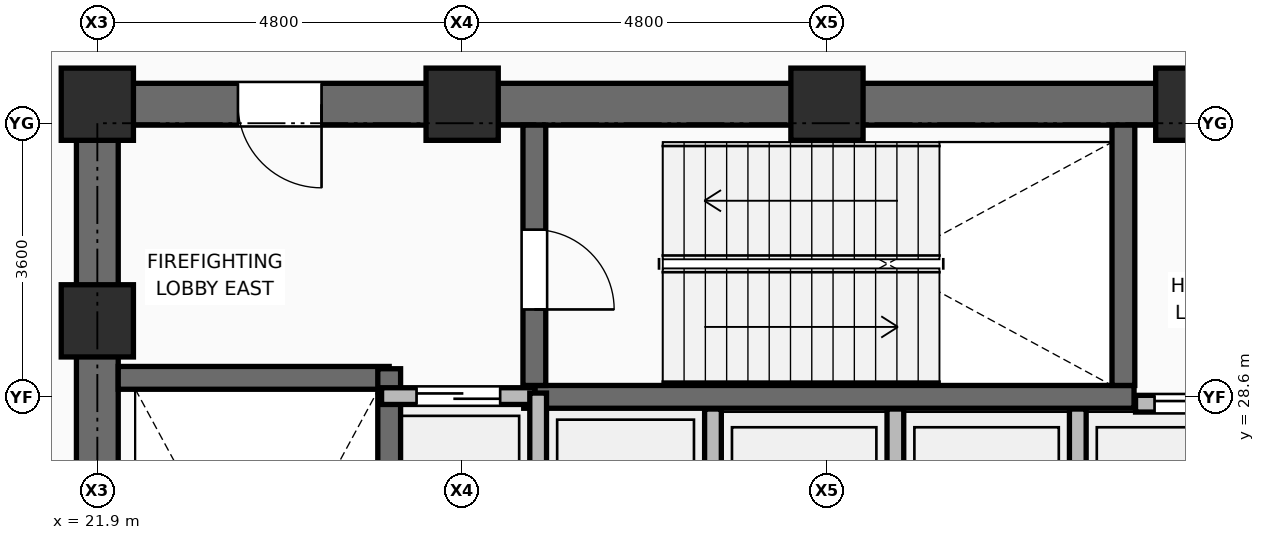
"""IFC4 building model, lengths in metres.
Left out: names, types, materials, properties, quantities, classifications, styles, units other than length and angle.
Written with IfcOpenShell. Run it as: python <this file> out.ifc"""

import sys

from ifc_helpers import new_model, si_unit, direction, frame, frame_2d, origin, origin_2d, place, context, subcontext, project, spatial, rectangle, extrude, element, fill, save


model = new_model("IFC4")
c1 = context("Model", 3, precision=1e-05, world=origin(), true_north=direction((0.0, 1.0)))
c2 = subcontext(c1, "Body", "Model", "MODEL_VIEW")
j1 = project(units=[si_unit("LENGTHUNIT", "METRE"), si_unit("PLANEANGLEUNIT", "RADIAN")], contexts=[c1])
p1 = place(None, origin())
s1 = spatial("IfcSite", under=j1, at=p1, CompositionType="ELEMENT")
p2 = place(p1, origin())
s2 = spatial("IfcBuilding", under=s1, at=p2, CompositionType="ELEMENT")
p3 = place(p2, frame((0.0, 0.0, 96.15)))
s3 = spatial("IfcBuildingStorey", under=s2, at=p3, CompositionType="ELEMENT", Elevation=96.15)
for number, where, z_axis, x_axis in (
    (1, (21.9, 29.6, 0.0), (0.0, 0.0, 1.0), (1.0, 0.0, 0.0)),
    (2, (21.9, 32.45, 0.0), (0.0, 0.0, 1.0), (1.0, 0.0, 0.0)),
    (3, (26.7, 32.45, 0.0), (0.0, 0.0, 1.0), (1.0, 0.0, 0.0)),
    (4, (31.5, 32.45, 0.0), (0.0, 0.0, 1.0), (1.0, 0.0, 0.0)),
    (5, (36.3, 32.45, 0.0), (0.0, 0.0, 1.0), (1.0, 0.0, 0.0)),
):
    element("IfcColumn", number, at=place(p3, frame(where, z_axis=z_axis, x_axis=x_axis)), inside=s3, PredefinedType="COLUMN", context=c2, shape_type="SweptSolid", body=[
        extrude(rectangle(XDim=0.95, YDim=0.95, at=origin_2d()), origin(), (0.0, 0.0, 1.0), 4.8),
    ])
p4 = place(p3, frame((30.0, 25.71, 0.0), z_axis=(0.0, 0.0, 1.0), x_axis=(0.0, 1.0, 0.0)))
e6 = element("IfcWall", 6, at=p4, inside=s3, PredefinedType="PARTITIONING", context=c2, shape_type="SweptSolid", body=[
    extrude(rectangle(XDim=2.73, YDim=0.22, at=frame_2d((1.365, 0.0))), origin(), (0.0, 0.0, 1.0), 4.595),
])
p5 = place(p3, frame((32.4, 26.2, 0.0), z_axis=(0.0, 0.0, 1.0), x_axis=(0.0, 1.0, 0.0)))
e7 = element("IfcWall", 7, at=p5, inside=s3, PredefinedType="PARTITIONING", context=c2, shape_type="SweptSolid", body=[
    extrude(rectangle(XDim=2.24, YDim=0.22, at=frame_2d((1.12, 0.0))), origin(), (0.0, 0.0, 1.0), 4.595),
])
p6 = place(p3, frame((34.8, 26.23, 0.0), z_axis=(0.0, 0.0, 1.0), x_axis=(0.0, 1.0, 0.0)))
e8 = element("IfcWall", 8, at=p6, inside=s3, PredefinedType="PARTITIONING", context=c2, shape_type="SweptSolid", body=[
    extrude(rectangle(XDim=2.21, YDim=0.22, at=frame_2d((1.105, 0.0))), origin(), (0.0, 0.0, 1.0), 4.595),
])
p7 = place(p3, frame((21.625, 32.45, 0.0), z_axis=(0.0, 0.0, 1.0), x_axis=(1.0, 0.0, 0.0)))
e9 = element("IfcWall", 9, at=p7, inside=s3, PredefinedType="SHEAR", context=c2, shape_type="SweptSolid", body=[
    extrude(rectangle(XDim=19.75, YDim=0.55, at=frame_2d((9.875, 0.0))), origin(), (0.0, 0.0, 1.0), 4.62),
])
p8 = place(p7, frame((2.125, 0.0, 0.0)))
e10 = element("IfcOpeningElement", 10, at=p8, cuts=e9, PredefinedType="OPENING", context=c2, shape_type="SweptSolid", body=[
    extrude(rectangle(XDim=1.1, YDim=2.1, at=frame_2d((0.55, 1.05))), frame((0.0, 0.285, 0.0), z_axis=(0.0, -1.0, 0.0), x_axis=(1.0, 0.0, 0.0)), (0.0, 0.0, 1.0), 0.57),
])
p9 = place(p7, frame((15.515, 0.0, 0.0)))
e11 = element("IfcOpeningElement", 11, at=p9, cuts=e9, PredefinedType="OPENING", context=c2, shape_type="SweptSolid", body=[
    extrude(rectangle(XDim=1.0, YDim=2.1, at=frame_2d((0.5, 1.05))), frame((0.0, 0.285, 0.0), z_axis=(0.0, -1.0, 0.0), x_axis=(1.0, 0.0, 0.0)), (0.0, 0.0, 1.0), 0.57),
])
p10 = place(p7, frame((17.525, 0.0, 0.0)))
e12 = element("IfcOpeningElement", 12, at=p10, cuts=e9, PredefinedType="OPENING", context=c2, shape_type="SweptSolid", body=[
    extrude(rectangle(XDim=0.9, YDim=2.1, at=frame_2d((0.45, 1.05))), frame((0.0, 0.285, 0.0), z_axis=(0.0, -1.0, 0.0), x_axis=(1.0, 0.0, 0.0)), (0.0, 0.0, 1.0), 0.57),
])
p11 = place(p3, frame((21.9, 18.075, 0.0), z_axis=(0.0, 0.0, 1.0), x_axis=(0.0, 1.0, 0.0)))
e13 = element("IfcWall", 13, at=p11, inside=s3, PredefinedType="SHEAR", context=c2, shape_type="SweptSolid", body=[
    extrude(rectangle(XDim=14.1, YDim=0.55, at=frame_2d((7.05, 0.0))), origin(), (0.0, 0.0, 1.0), 4.62),
])
p12 = place(p3, frame((22.175, 28.85, 0.0), z_axis=(0.0, 0.0, 1.0), x_axis=(1.0, 0.0, 0.0)))
e14 = element("IfcWall", 14, at=p12, inside=s3, PredefinedType="SHEAR", context=c2, shape_type="SweptSolid", body=[
    extrude(rectangle(XDim=3.565, YDim=0.3, at=frame_2d((1.782, 0.0))), origin(), (0.0, 0.0, 1.0), 4.62),
])
p13 = place(p3, frame((25.74, 20.98, 0.0), z_axis=(0.0, 0.0, 1.0), x_axis=(0.0, 1.0, 0.0)))
e15 = element("IfcWall", 15, at=p13, inside=s3, PredefinedType="SHEAR", context=c2, shape_type="SweptSolid", body=[
    extrude(rectangle(XDim=7.99, YDim=0.3, at=frame_2d((3.995, 0.0))), origin(), (0.0, 0.0, 1.0), 4.62),
])
p14 = place(p3, frame((27.51, 28.6, 0.0), z_axis=(0.0, 0.0, 1.0), x_axis=(1.0, 0.0, 0.0)))
e16 = element("IfcWall", 16, at=p14, inside=s3, PredefinedType="SHEAR", context=c2, shape_type="SweptSolid", body=[
    extrude(rectangle(XDim=8.03, YDim=0.3, at=frame_2d((4.015, 0.0))), origin(), (0.0, 0.0, 1.0), 4.62),
])
p15 = place(p3, frame((27.65, 28.75, 0.0), z_axis=(0.0, 0.0, 1.0), x_axis=(0.0, 1.0, 0.0)))
e17 = element("IfcWall", 17, at=p15, inside=s3, PredefinedType="SHEAR", context=c2, shape_type="SweptSolid", body=[
    extrude(rectangle(XDim=3.425, YDim=0.3, at=frame_2d((1.712, 0.0))), origin(), (0.0, 0.0, 1.0), 4.62),
])
p16 = place(p15, frame((1.0, 0.0, 0.0)))
e18 = element("IfcOpeningElement", 18, at=p16, cuts=e17, PredefinedType="OPENING", context=c2, shape_type="SweptSolid", body=[
    extrude(rectangle(XDim=1.05, YDim=2.1, at=frame_2d((0.525, 1.05))), frame((0.0, 0.16, 0.0), z_axis=(0.0, -1.0, 0.0), x_axis=(1.0, 0.0, 0.0)), (0.0, 0.0, 1.0), 0.32),
])
p17 = place(p3, frame((35.4, 28.75, 0.0), z_axis=(0.0, 0.0, 1.0), x_axis=(0.0, 1.0, 0.0)))
e19 = element("IfcWall", 19, at=p17, inside=s3, PredefinedType="SHEAR", context=c2, shape_type="SweptSolid", body=[
    extrude(rectangle(XDim=3.425, YDim=0.3, at=frame_2d((1.712, 0.0))), origin(), (0.0, 0.0, 1.0), 4.62),
])
p18 = place(p3, frame((25.64, 28.61, 0.0), z_axis=(0.0, 0.0, 1.0), x_axis=(1.0, 0.0, 0.0)))
e20 = element("IfcWall", 20, at=p18, inside=s3, PredefinedType="PARTITIONING", context=c2, shape_type="SweptSolid", body=[
    extrude(rectangle(XDim=2.02, YDim=0.22, at=frame_2d((1.01, 0.0))), origin(), (0.0, 0.0, 1.0), 4.6),
])
p19 = place(p18, frame((0.46, 0.0, 0.0)))
e21 = element("IfcOpeningElement", 21, at=p19, cuts=e20, PredefinedType="OPENING", context=c2, shape_type="SweptSolid", body=[
    extrude(rectangle(XDim=1.1, YDim=2.2, at=frame_2d((0.55, 1.1))), frame((0.0, 0.12, 0.0), z_axis=(0.0, -1.0, 0.0), x_axis=(1.0, 0.0, 0.0)), (0.0, 0.0, 1.0), 0.24),
])
p20 = place(p3, frame((35.56, 28.51, 0.0), z_axis=(0.0, 0.0, 1.0), x_axis=(1.0, 0.0, 0.0)))
e22 = element("IfcWall", 22, at=p20, inside=s3, PredefinedType="PARTITIONING", context=c2, shape_type="SweptSolid", body=[
    extrude(rectangle(XDim=1.6, YDim=0.22, at=frame_2d((0.8, 0.0))), origin(), (0.0, 0.0, 1.0), 4.6),
])
p21 = place(p20, frame((0.25, 0.0, 0.0)))
e23 = element("IfcOpeningElement", 23, at=p21, cuts=e22, PredefinedType="OPENING", context=c2, shape_type="SweptSolid", body=[
    extrude(rectangle(XDim=1.1, YDim=2.2, at=frame_2d((0.55, 1.1))), frame((0.0, 0.12, 0.0), z_axis=(0.0, -1.0, 0.0), x_axis=(1.0, 0.0, 0.0)), (0.0, 0.0, 1.0), 0.24),
])
p22 = place(p3, frame((27.7, 25.65, 0.0), z_axis=(0.0, 0.0, 1.0), x_axis=(0.0, 1.0, 0.0)))
e24 = element("IfcWall", 24, at=p22, inside=s3, PredefinedType="PARTITIONING", context=c2, shape_type="SweptSolid", body=[
    extrude(rectangle(XDim=3.0, YDim=0.22, at=frame_2d((1.5, 0.0))), origin(), (0.0, 0.0, 1.0), 4.6),
])
p23 = place(p16, frame((1.05, 0.0, 0.0), z_axis=(0.0, 0.0, 1.0), x_axis=(-1.0, 0.0, 0.0)))
e25 = element("IfcDoor", 25, at=p23, inside=s3, OperationType="SINGLE_SWING_RIGHT", PredefinedType="DOOR", context=c2, shape_type="SweptSolid", body=[
    extrude(rectangle(XDim=1.05, YDim=2.1, at=frame_2d((0.525, 1.05))), frame((0.0, 0.025, 0.0), z_axis=(0.0, -1.0, 0.0), x_axis=(1.0, 0.0, 0.0)), (0.0, 0.0, 1.0), 0.05),
])
fill(e18, e25)
p24 = place(p19, origin())
e26 = element("IfcDoor", 26, at=p24, inside=s3, OperationType="DOUBLE_DOOR_SLIDING", PredefinedType="DOOR", context=c2, shape_type="SweptSolid", body=[
    extrude(rectangle(XDim=1.1, YDim=2.2, at=frame_2d((0.55, 1.1))), frame((0.0, 0.025, 0.0), z_axis=(0.0, -1.0, 0.0), x_axis=(1.0, 0.0, 0.0)), (0.0, 0.0, 1.0), 0.05),
])
fill(e21, e26)
p25 = place(p21, origin())
e27 = element("IfcDoor", 27, at=p25, inside=s3, OperationType="DOUBLE_DOOR_SLIDING", PredefinedType="DOOR", context=c2, shape_type="SweptSolid", body=[
    extrude(rectangle(XDim=1.1, YDim=2.2, at=frame_2d((0.55, 1.1))), frame((0.0, 0.025, 0.0), z_axis=(0.0, -1.0, 0.0), x_axis=(1.0, 0.0, 0.0)), (0.0, 0.0, 1.0), 0.05),
])
fill(e23, e27)
p26 = place(p8, frame((1.1, 0.0, 0.0), z_axis=(0.0, 0.0, 1.0), x_axis=(-1.0, 0.0, 0.0)))
e28 = element("IfcDoor", 28, at=p26, inside=s3, OperationType="SINGLE_SWING_LEFT", PredefinedType="DOOR", context=c2, shape_type="SweptSolid", body=[
    extrude(rectangle(XDim=1.1, YDim=2.1, at=frame_2d((0.55, 1.05))), frame((0.0, 0.025, 0.0), z_axis=(0.0, -1.0, 0.0), x_axis=(1.0, 0.0, 0.0)), (0.0, 0.0, 1.0), 0.05),
])
fill(e10, e28)
save(model, sys.argv[1])
